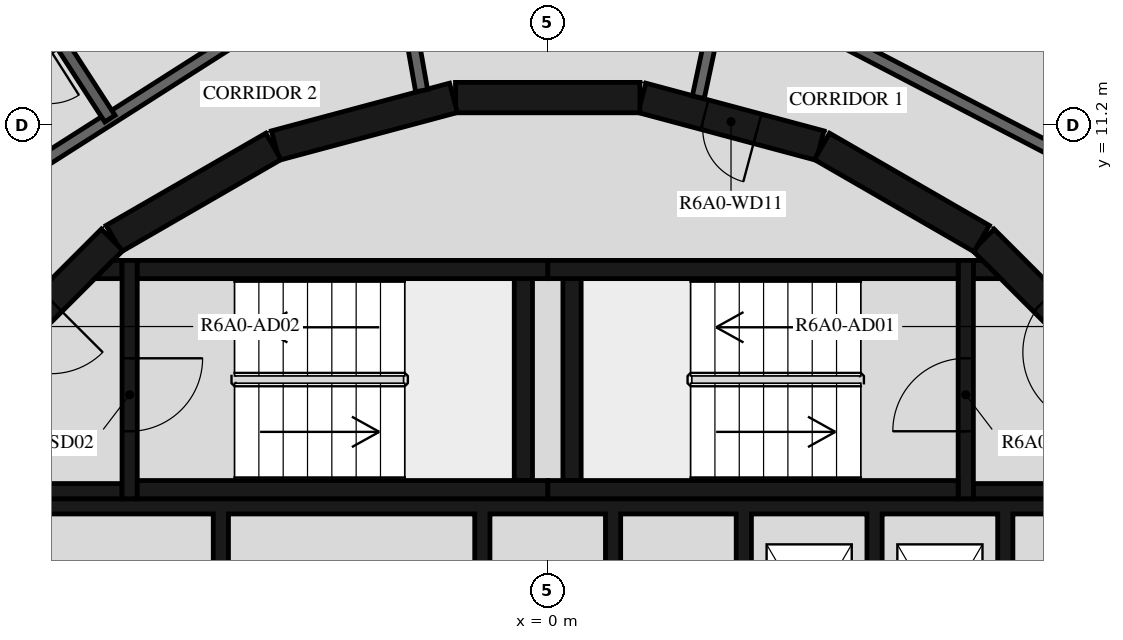
"""IFC4 building model, lengths in metres.
Left out: names, types, materials, properties, quantities, classifications, styles, units other than length and angle.
Written with IfcOpenShell. Run it as: python <this file> out.ifc"""

import sys

from ifc_helpers import new_model, si_unit, direction, frame, frame_2d, origin, place, context, subcontext, project, spatial, polyline, rectangle, outline, extrude, element, fill, save


model = new_model("IFC4")
c1 = context("Model", 3, precision=1e-05, world=origin(), true_north=direction((0.0, 1.0)))
c2 = subcontext(c1, "Body", "Model", "MODEL_VIEW")
j1 = project(units=[si_unit("LENGTHUNIT", "METRE"), si_unit("PLANEANGLEUNIT", "RADIAN")], contexts=[c1])
p1 = place(None, origin())
s1 = spatial("IfcSite", under=j1, at=p1, CompositionType="ELEMENT")
p2 = place(p1, origin())
s2 = spatial("IfcBuilding", under=s1, at=p2, CompositionType="ELEMENT")
p3 = place(p2, frame((0.0, 0.0, 226.7)))
s3 = spatial("IfcBuildingStorey", under=s2, at=p3, CompositionType="ELEMENT", Elevation=226.7)
p4 = place(p3, frame((9.308, 7.164, 0.0), z_axis=(0.0, 0.0, 1.0), x_axis=(-0.707106781187, 0.707106781187, 0.0)))
e1 = element("IfcWall", 1, at=p4, inside=s3, PredefinedType="SHEAR", context=c2, shape_type="SweptSolid", body=[
    extrude(rectangle(XDim=3.032, YDim=0.5, at=frame_2d((1.516, 0.0))), origin(), (0.0, 0.0, 1.0), 3.12),
])
p5 = place(p4, frame((0.416, 0.0, 0.0)))
e2 = element("IfcOpeningElement", 2, at=p5, cuts=e1, PredefinedType="OPENING", context=c2, shape_type="SweptSolid", body=[
    extrude(rectangle(XDim=1.2, YDim=2.1, at=frame_2d((0.6, 1.05))), frame((0.0, 0.26, 0.0), z_axis=(0.0, -1.0, 0.0), x_axis=(1.0, 0.0, 0.0)), (0.0, 0.0, 1.0), 0.52),
])
p6 = place(p3, frame((7.137, 9.329, 0.0), z_axis=(0.0, 0.0, 1.0), x_axis=(-0.865975092491, 0.500087131594, 0.0)))
e3 = element("IfcWall", 3, at=p6, inside=s3, PredefinedType="SHEAR", context=c2, shape_type="SweptSolid", body=[
    extrude(rectangle(XDim=3.033, YDim=0.5, at=frame_2d((1.516, 0.0))), origin(), (0.0, 0.0, 1.0), 3.12),
])
p7 = place(p3, frame((4.479, 10.858, 0.0), z_axis=(0.0, 0.0, 1.0), x_axis=(-0.965948410781, 0.258734743916, 0.0)))
e4 = element("IfcWall", 4, at=p7, inside=s3, PredefinedType="SHEAR", context=c2, shape_type="SweptSolid", body=[
    extrude(rectangle(XDim=3.033, YDim=0.5, at=frame_2d((1.516, 0.0))), origin(), (0.0, 0.0, 1.0), 3.12),
])
p8 = place(p7, frame((1.066, 0.0, 0.0)))
e5 = element("IfcOpeningElement", 5, at=p8, cuts=e4, PredefinedType="OPENING", context=c2, shape_type="SweptSolid", body=[
    extrude(rectangle(XDim=0.9, YDim=2.1, at=frame_2d((0.45, 1.05))), frame((0.0, 0.26, 0.0), z_axis=(0.0, -1.0, 0.0), x_axis=(1.0, 0.0, 0.0)), (0.0, 0.0, 1.0), 0.52),
])
for number, where, z_axis, x_axis in (
    (6, (1.516, 11.647, 0.0), (0.0, 0.0, 1.0), (-1.0, 0.0, 0.0)),
    (7, (-1.55, 11.643, 0.0), (0.0, 0.0, 1.0), (-0.966, -0.259, 0.0)),
    (8, (-4.51, 10.845, 0.0), (0.0, 0.0, 1.0), (-0.866, -0.5, 0.0)),
):
    element("IfcWall", number, at=place(p3, frame(where, z_axis=z_axis, x_axis=x_axis)), inside=s3, PredefinedType="SHEAR", context=c2, shape_type="SweptSolid", body=[
        extrude(rectangle(XDim=3.033, YDim=0.5, at=frame_2d((1.516, 0.0))), origin(), (0.0, 0.0, 1.0), 3.12),
    ])
p9 = place(p3, frame((-7.164, 9.308, 0.0), z_axis=(0.0, 0.0, 1.0), x_axis=(-0.707106781187, -0.707106781187, 0.0)))
e9 = element("IfcWall", 9, at=p9, inside=s3, PredefinedType="SHEAR", context=c2, shape_type="SweptSolid", body=[
    extrude(rectangle(XDim=3.032, YDim=0.5, at=frame_2d((1.516, 0.0))), origin(), (0.0, 0.0, 1.0), 3.12),
])
p10 = place(p9, frame((1.416, 0.0, 0.0)))
e10 = element("IfcOpeningElement", 10, at=p10, cuts=e9, PredefinedType="OPENING", context=c2, shape_type="SweptSolid", body=[
    extrude(rectangle(XDim=1.2, YDim=2.1, at=frame_2d((0.6, 1.05))), frame((0.0, 0.26, 0.0), z_axis=(0.0, -1.0, 0.0), x_axis=(1.0, 0.0, 0.0)), (0.0, 0.0, 1.0), 0.52),
])
for number, where, z_axis, x_axis in (
    (11, (0.0, 5.2, 0.0), (0.0, 0.0, 1.0), (1.0, 0.0, 0.0)),
    (12, (0.0, 8.82, 0.0), (0.0, 0.0, 1.0), (1.0, 0.0, 0.0)),
):
    element("IfcWall", number, at=place(p3, frame(where, z_axis=z_axis, x_axis=x_axis)), inside=s3, PredefinedType="SHEAR", context=c2, shape_type="SweptSolid", body=[
        extrude(rectangle(XDim=6.75, YDim=0.3, at=frame_2d((3.375, 0.0))), origin(), (0.0, 0.0, 1.0), 3.12),
    ])
p11 = place(p3, frame((0.4, 5.35, 0.0), z_axis=(0.0, 0.0, 1.0), x_axis=(0.0, 1.0, 0.0)))
e13 = element("IfcWall", 13, at=p11, inside=s3, PredefinedType="SHEAR", context=c2, shape_type="SweptSolid", body=[
    extrude(rectangle(XDim=3.32, YDim=0.3, at=frame_2d((1.66, 0.0))), origin(), (0.0, 0.0, 1.0), 3.12),
])
p12 = place(p3, frame((6.875, 5.05, 0.0), z_axis=(0.0, 0.0, 1.0), x_axis=(0.0, 1.0, 0.0)))
e14 = element("IfcWall", 14, at=p12, inside=s3, PredefinedType="SHEAR", context=c2, shape_type="SweptSolid", body=[
    extrude(rectangle(XDim=3.92, YDim=0.25, at=frame_2d((1.96, 0.0))), origin(), (0.0, 0.0, 1.0), 3.12),
])
p13 = place(p12, frame((1.11, 0.0, 0.0)))
e15 = element("IfcOpeningElement", 15, at=p13, cuts=e14, PredefinedType="OPENING", context=c2, shape_type="SweptSolid", body=[
    extrude(rectangle(XDim=1.2, YDim=2.1, at=frame_2d((0.6, 1.05))), frame((0.0, 0.135, 0.0), z_axis=(0.0, -1.0, 0.0), x_axis=(1.0, 0.0, 0.0)), (0.0, 0.0, 1.0), 0.27),
])
p14 = place(p3, frame((7.0, 5.175, 0.0), z_axis=(0.0, 0.0, 1.0), x_axis=(1.0, 0.0, 0.0)))
e16 = element("IfcWall", 16, at=p14, inside=s3, PredefinedType="SHEAR", context=c2, shape_type="SweptSolid", body=[
    extrude(rectangle(XDim=3.1, YDim=0.25, at=frame_2d((1.55, 0.0))), origin(), (0.0, 0.0, 1.0), 3.12),
])
p15 = place(p3, origin())
e17 = element("IfcWall", 17, at=p15, inside=s3, PredefinedType="SHEAR", context=c2, shape_type="SweptSolid", body=[
    extrude(outline(polyline([(7.448, 8.67), (7.0, 8.67), (7.0, 8.97), (7.148, 8.97), (7.448, 8.67)])), origin(), (0.0, 0.0, 1.0), 3.12),
])
for number, where, z_axis, x_axis in (
    (18, (-6.75, 5.2, 0.0), (0.0, 0.0, 1.0), (1.0, 0.0, 0.0)),
    (19, (-6.75, 8.82, 0.0), (0.0, 0.0, 1.0), (1.0, 0.0, 0.0)),
):
    element("IfcWall", number, at=place(p3, frame(where, z_axis=z_axis, x_axis=x_axis)), inside=s3, PredefinedType="SHEAR", context=c2, shape_type="SweptSolid", body=[
        extrude(rectangle(XDim=6.75, YDim=0.3, at=frame_2d((3.375, 0.0))), origin(), (0.0, 0.0, 1.0), 3.12),
    ])
p16 = place(p3, frame((-0.4, 5.35, 0.0), z_axis=(0.0, 0.0, 1.0), x_axis=(0.0, 1.0, 0.0)))
e20 = element("IfcWall", 20, at=p16, inside=s3, PredefinedType="SHEAR", context=c2, shape_type="SweptSolid", body=[
    extrude(rectangle(XDim=3.32, YDim=0.3, at=frame_2d((1.66, 0.0))), origin(), (0.0, 0.0, 1.0), 3.12),
])
p17 = place(p3, frame((-6.875, 8.97, 0.0), z_axis=(0.0, 0.0, 1.0), x_axis=(0.0, -1.0, 0.0)))
e21 = element("IfcWall", 21, at=p17, inside=s3, PredefinedType="SHEAR", context=c2, shape_type="SweptSolid", body=[
    extrude(rectangle(XDim=3.92, YDim=0.25, at=frame_2d((1.96, 0.0))), origin(), (0.0, 0.0, 1.0), 3.12),
])
p18 = place(p17, frame((1.61, 0.0, 0.0)))
e22 = element("IfcOpeningElement", 22, at=p18, cuts=e21, PredefinedType="OPENING", context=c2, shape_type="SweptSolid", body=[
    extrude(rectangle(XDim=1.2, YDim=2.1, at=frame_2d((0.6, 1.05))), frame((0.0, 0.135, 0.0), z_axis=(0.0, -1.0, 0.0), x_axis=(1.0, 0.0, 0.0)), (0.0, 0.0, 1.0), 0.27),
])
p19 = place(p3, frame((-7.0, 5.175, 0.0), z_axis=(0.0, 0.0, 1.0), x_axis=(-1.0, 0.0, 0.0)))
e23 = element("IfcWall", 23, at=p19, inside=s3, PredefinedType="SHEAR", context=c2, shape_type="SweptSolid", body=[
    extrude(rectangle(XDim=3.1, YDim=0.25, at=frame_2d((1.55, 0.0))), origin(), (0.0, 0.0, 1.0), 3.12),
])
p20 = place(p3, origin())
e24 = element("IfcWall", 24, at=p20, inside=s3, PredefinedType="SHEAR", context=c2, shape_type="SweptSolid", body=[
    extrude(outline(polyline([(-7.148, 8.97), (-7.0, 8.97), (-7.0, 8.67), (-7.448, 8.67), (-7.148, 8.97)])), origin(), (0.0, 0.0, 1.0), 3.12),
])
p21 = place(p3, origin())
e25 = element("IfcWall", 25, at=p21, inside=s3, PredefinedType="SHEAR", context=c2, shape_type="SweptSolid", body=[
    extrude(outline(polyline([(-9.55, 4.8), (-5.5, 4.8), (-5.5, 1.9), (-5.25, 1.9), (-5.25, 4.8), (-1.2, 4.8), (-1.2, 1.9), (-0.95, 1.9), (-0.95, 4.8), (0.95, 4.8), (0.95, 1.9), (1.2, 1.9), (1.2, 4.8), (3.1, 4.8), (3.1, 1.9), (3.35, 1.9), (3.35, 4.8), (5.25, 4.8), (5.25, 1.9), (5.5, 1.9), (5.5, 4.8), (7.4, 4.8), (7.4, 1.9), (7.65, 1.9), (7.65, 4.8), (9.55, 4.8), (9.55, 1.9), (9.8, 1.9), (9.8, 4.8), (9.8, 5.05), (-9.8, 5.05), (-9.8, 4.8), (-9.8, 1.9), (-9.55, 1.9), (-9.55, 4.8)])), origin(), (0.0, 0.0, 1.0), 3.12),
])
p22 = place(p3, frame((9.372, 10.228, 0.0), z_axis=(0.0, 0.0, 1.0), x_axis=(-0.887005184532, 0.461759464021, 0.0)))
e26 = element("IfcWall", 26, at=p22, inside=s3, PredefinedType="STANDARD", context=c2, shape_type="SweptSolid", body=[
    extrude(rectangle(XDim=7.181, YDim=0.2, at=frame_2d((3.591, 0.0))), origin(), (0.0, 0.0, 1.0), 3.12),
])
p23 = place(p3, frame((2.878, 13.538, 0.0), z_axis=(0.0, 0.0, 1.0), x_axis=(-0.207893604596, -0.978151444904, 0.0)))
e27 = element("IfcWall", 27, at=p23, inside=s3, PredefinedType="STANDARD", context=c2, shape_type="SweptSolid", body=[
    extrude(rectangle(XDim=1.927, YDim=0.2, at=frame_2d((0.963, 0.0))), origin(), (0.0, 0.0, 1.0), 3.12),
])
p24 = place(p3, frame((-2.074, 11.761, 0.0), z_axis=(0.0, 0.0, 1.0), x_axis=(-0.173679082312, 0.984802303189, 0.0)))
e28 = element("IfcWall", 28, at=p24, inside=s3, PredefinedType="STANDARD", context=c2, shape_type="SweptSolid", body=[
    extrude(rectangle(XDim=1.573, YDim=0.2, at=frame_2d((0.787, 0.0))), origin(), (0.0, 0.0, 1.0), 3.12),
])
p25 = place(p3, frame((-4.172, 13.231, 0.0), z_axis=(0.0, 0.0, 1.0), x_axis=(-0.843388394728, -0.537304397561, 0.0)))
e29 = element("IfcWall", 29, at=p25, inside=s3, PredefinedType="STANDARD", context=c2, shape_type="SweptSolid", body=[
    extrude(rectangle(XDim=7.181, YDim=0.2, at=frame_2d((3.59, 0.0))), origin(), (0.0, 0.0, 1.0), 3.12),
])
p26 = place(p3, frame((-8.738, 13.677, 0.0), z_axis=(0.0, 0.0, 1.0), x_axis=(0.54358037296, -0.839357121929, 0.0)))
e30 = element("IfcWall", 30, at=p26, inside=s3, PredefinedType="STANDARD", context=c2, shape_type="SweptSolid", body=[
    extrude(rectangle(XDim=2.83, YDim=0.2, at=frame_2d((1.415, 0.0))), origin(), (0.0, 0.0, 1.0), 3.12),
])
p27 = place(p3, frame((10.421, 11.373, 0.0), z_axis=(0.0, 0.0, 1.0), x_axis=(-0.887012970857, 0.461744506769, 0.0)))
e31 = element("IfcWall", 31, at=p27, inside=s3, PredefinedType="PARTITIONING", context=c2, shape_type="SweptSolid", body=[
    extrude(rectangle(XDim=7.985, YDim=0.12, at=frame_2d((3.992, 0.0))), origin(), (0.0, 0.0, 1.0), 3.12),
])
p28 = place(p27, frame((5.448, 0.0, 0.0)))
e32 = element("IfcOpeningElement", 32, at=p28, cuts=e31, PredefinedType="OPENING", context=c2, shape_type="SweptSolid", body=[
    extrude(rectangle(XDim=0.9, YDim=2.1, at=frame_2d((0.45, 1.05))), frame((0.0, 0.07, 0.0), z_axis=(0.0, -1.0, 0.0), x_axis=(1.0, 0.0, 0.0)), (0.0, 0.0, 1.0), 0.14),
])
p29 = place(p3, frame((-8.023, 12.555, 0.0), z_axis=(0.0, 0.0, 1.0), x_axis=(-0.843408270233, -0.537273198385, 0.0)))
e33 = element("IfcWall", 33, at=p29, inside=s3, PredefinedType="PARTITIONING", context=c2, shape_type="SweptSolid", body=[
    extrude(rectangle(XDim=3.971, YDim=0.12, at=frame_2d((1.986, 0.0))), origin(), (0.0, 0.0, 1.0), 3.12),
])
p30 = place(p29, frame((0.2, 0.0, 0.0)))
e34 = element("IfcOpeningElement", 34, at=p30, cuts=e33, PredefinedType="OPENING", context=c2, shape_type="SweptSolid", body=[
    extrude(rectangle(XDim=0.9, YDim=2.1, at=frame_2d((0.45, 1.05))), frame((0.0, 0.07, 0.0), z_axis=(0.0, -1.0, 0.0), x_axis=(1.0, 0.0, 0.0)), (0.0, 0.0, 1.0), 0.14),
])
p31 = place(p13, origin())
e35 = element("IfcDoor", 35, at=p31, inside=s3, OperationType="SINGLE_SWING_LEFT", PredefinedType="DOOR", context=c2, shape_type="SweptSolid", body=[
    extrude(rectangle(XDim=1.2, YDim=2.1, at=frame_2d((0.6, 1.05))), frame((0.0, 0.025, 0.0), z_axis=(0.0, -1.0, 0.0), x_axis=(1.0, 0.0, 0.0)), (0.0, 0.0, 1.0), 0.05),
])
fill(e15, e35)
p32 = place(p5, origin())
e36 = element("IfcDoor", 36, at=p32, inside=s3, OperationType="SINGLE_SWING_RIGHT", PredefinedType="DOOR", context=c2, shape_type="SweptSolid", body=[
    extrude(rectangle(XDim=1.2, YDim=2.1, at=frame_2d((0.6, 1.05))), frame((0.0, 0.025, 0.0), z_axis=(0.0, -1.0, 0.0), x_axis=(1.0, 0.0, 0.0)), (0.0, 0.0, 1.0), 0.05),
])
fill(e2, e36)
p33 = place(p18, origin())
e37 = element("IfcDoor", 37, at=p33, inside=s3, OperationType="SINGLE_SWING_LEFT", PredefinedType="DOOR", context=c2, shape_type="SweptSolid", body=[
    extrude(rectangle(XDim=1.2, YDim=2.1, at=frame_2d((0.6, 1.05))), frame((0.0, 0.025, 0.0), z_axis=(0.0, -1.0, 0.0), x_axis=(1.0, 0.0, 0.0)), (0.0, 0.0, 1.0), 0.05),
])
fill(e22, e37)
p34 = place(p10, origin())
e38 = element("IfcDoor", 38, at=p34, inside=s3, OperationType="SINGLE_SWING_RIGHT", PredefinedType="DOOR", context=c2, shape_type="SweptSolid", body=[
    extrude(rectangle(XDim=1.2, YDim=2.1, at=frame_2d((0.6, 1.05))), frame((0.0, 0.025, 0.0), z_axis=(0.0, -1.0, 0.0), x_axis=(1.0, 0.0, 0.0)), (0.0, 0.0, 1.0), 0.05),
])
fill(e10, e38)
p35 = place(p8, origin())
e39 = element("IfcDoor", 39, at=p35, inside=s3, OperationType="SINGLE_SWING_LEFT", PredefinedType="DOOR", context=c2, shape_type="SweptSolid", body=[
    extrude(rectangle(XDim=0.9, YDim=2.1, at=frame_2d((0.45, 1.05))), frame((0.0, 0.025, 0.0), z_axis=(0.0, -1.0, 0.0), x_axis=(1.0, 0.0, 0.0)), (0.0, 0.0, 1.0), 0.05),
])
fill(e5, e39)
save(model, sys.argv[1])
